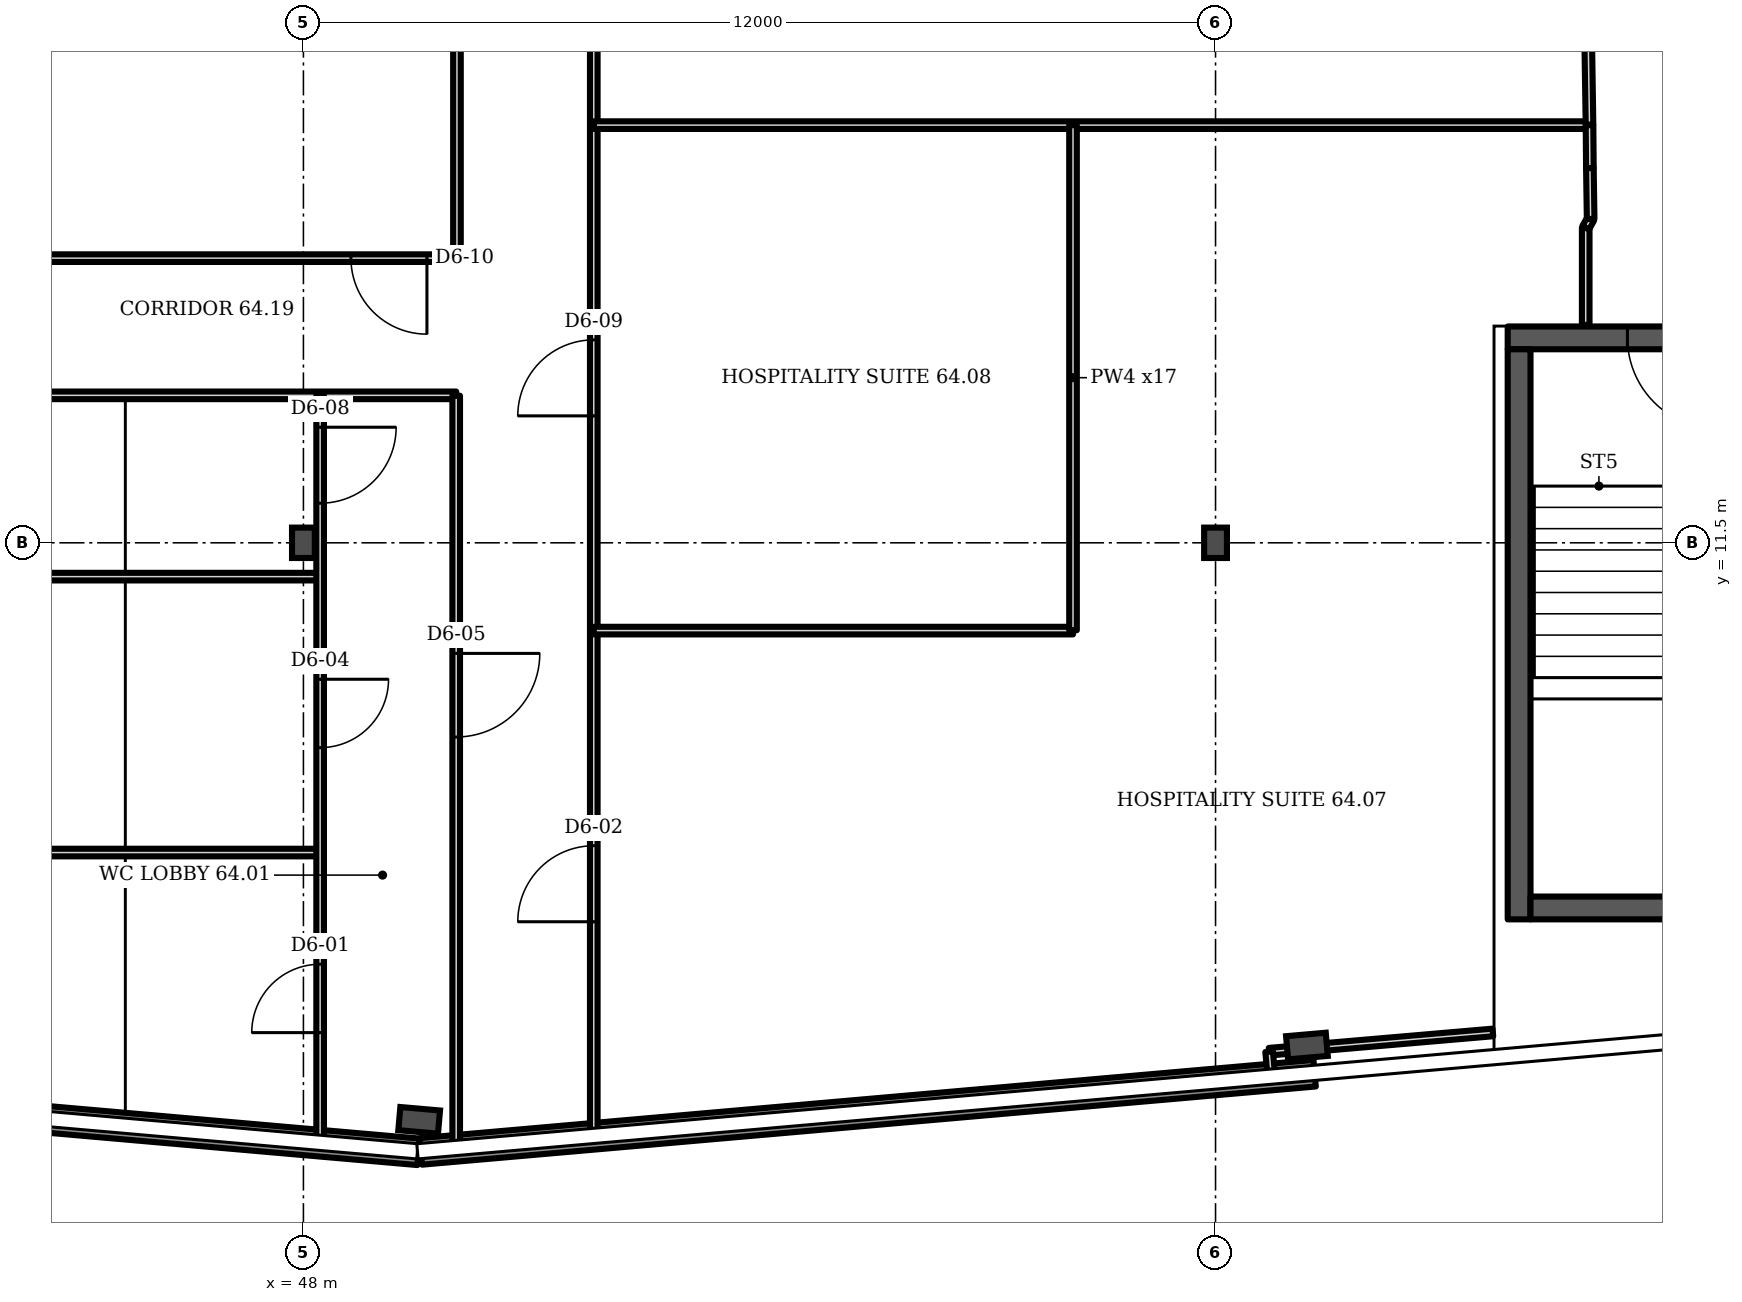
"""IFC4 building model, lengths in metres.
Left out: names, types, materials, properties, quantities, classifications, styles, units other than length and angle.
Written with IfcOpenShell. Run it as: python <this file> out.ifc"""

import sys

from ifc_helpers import new_model, si_unit, direction, frame, frame_2d, origin, origin_2d, place, context, subcontext, project, spatial, rectangle, i_section, extrude, element, fill, save


model = new_model("IFC4")
c1 = context("Model", 3, precision=1e-05, world=origin(), true_north=direction((0.0, 1.0)))
c2 = subcontext(c1, "Body", "Model", "MODEL_VIEW")
j1 = project(units=[si_unit("LENGTHUNIT", "METRE"), si_unit("PLANEANGLEUNIT", "RADIAN")], contexts=[c1])
p1 = place(None, origin())
s1 = spatial("IfcSite", under=j1, at=p1, CompositionType="ELEMENT")
p2 = place(p1, origin())
s2 = spatial("IfcBuilding", under=s1, at=p2, CompositionType="ELEMENT")
p3 = place(p2, frame((0.0, 0.0, 253.9)))
s3 = spatial("IfcBuildingStorey", under=s2, at=p3, CompositionType="ELEMENT", Elevation=253.9)
for number, where, z_axis, x_axis in (
    (1, (49.523, 3.902, 0.0), (0.0, 0.0, 1.0), (-0.087, -0.996, 0.0)),
    (2, (61.202, 4.879, 0.0), (0.0, 0.0, 1.0), (0.087, -0.996, 0.0)),
):
    element("IfcColumn", number, at=place(p3, frame(where, z_axis=z_axis, x_axis=x_axis)), inside=s3, PredefinedType="COLUMN", context=c2, shape_type="SweptSolid", body=[
        extrude(i_section(OverallWidth=0.306, OverallDepth=0.524, WebThickness=0.021, FlangeThickness=0.04, FilletRadius=0.027, at=origin_2d()), origin(), (0.0, 0.0, 1.0), 3.6),
    ])
for number, where, z_axis, x_axis in (
    (3, (48.0, 11.5, 0.0), (0.0, 0.0, 1.0), (1.0, 0.0, 0.0)),
    (4, (60.0, 11.5, 0.0), (0.0, 0.0, 1.0), (1.0, 0.0, 0.0)),
):
    element("IfcColumn", number, at=place(p3, frame(where, z_axis=z_axis, x_axis=x_axis)), inside=s3, PredefinedType="COLUMN", context=c2, shape_type="SweptSolid", body=[
        extrude(i_section(OverallWidth=0.3, OverallDepth=0.4, WebThickness=0.013, FlangeThickness=0.024, FilletRadius=0.027, at=origin_2d()), origin(), (0.0, 0.0, 1.0), 3.6),
    ])
p4 = place(p3, frame((37.729, 4.519, 0.0), z_axis=(0.0, 0.0, 1.0), x_axis=(0.99619, -0.087167, 0.0)))
e5 = element("IfcWall", 5, at=p4, inside=s3, PredefinedType="SOLIDWALL", context=c2, shape_type="SweptSolid", body=[
    extrude(rectangle(XDim=11.831, YDim=0.35, at=frame_2d((5.915, 0.0))), origin(), (0.0, 0.0, 1.0), 1.0),
])
p5 = place(p3, frame((49.545, 3.493, 0.0), z_axis=(0.0, 0.0, 1.0), x_axis=(0.996196, 0.087141, 0.0)))
e6 = element("IfcWall", 6, at=p5, inside=s3, PredefinedType="SOLIDWALL", context=c2, shape_type="SweptSolid", body=[
    extrude(rectangle(XDim=11.803, YDim=0.35, at=frame_2d((5.902, 0.0))), origin(), (0.0, 0.0, 1.0), 1.0),
])
p6 = place(p3, frame((63.844, 14.196, 0.0), z_axis=(0.0, 0.0, 1.0), x_axis=(1.0, 0.0, 0.0)))
e7 = element("IfcWall", 7, at=p6, inside=s3, PredefinedType="SHEAR", context=c2, shape_type="SweptSolid", body=[
    extrude(rectangle(XDim=4.35, YDim=0.3, at=frame_2d((2.175, 0.0))), origin(), (0.0, 0.0, 1.0), 3.2),
])
p7 = place(p6, frame((1.575, 0.0, 0.0)))
e8 = element("IfcOpeningElement", 8, at=p7, cuts=e7, PredefinedType="OPENING", context=c2, shape_type="SweptSolid", body=[
    extrude(rectangle(XDim=1.2, YDim=2.1, at=frame_2d((0.6, 1.05))), frame((0.0, 0.16, 0.0), z_axis=(0.0, -1.0, 0.0), x_axis=(1.0, 0.0, 0.0)), (0.0, 0.0, 1.0), 0.32),
])
p8 = place(p3, frame((40.5, 15.245, 0.0), z_axis=(0.0, 0.0, 1.0), x_axis=(1.0, 0.0, 0.0)))
e9 = element("IfcWall", 9, at=p8, inside=s3, PredefinedType="PARTITIONING", context=c2, shape_type="SweptSolid", body=[
    extrude(rectangle(XDim=9.52, YDim=0.1, at=frame_2d((4.76, 0.0))), origin(), (0.0, 0.0, 1.0), 3.2),
])
p9 = place(p8, frame((8.125, 0.0, 0.0)))
e10 = element("IfcOpeningElement", 10, at=p9, cuts=e9, PredefinedType="OPENING", context=c2, shape_type="SweptSolid", body=[
    extrude(rectangle(XDim=1.0, YDim=2.1, at=frame_2d((0.5, 1.05))), frame((0.0, 0.06, 0.0), z_axis=(0.0, -1.0, 0.0), x_axis=(1.0, 0.0, 0.0)), (0.0, 0.0, 1.0), 0.12),
])
for number, where, z_axis, x_axis in (
    (11, (44.327, 7.425, 0.0), (0.0, 0.0, 1.0), (1.0, 0.0, 0.0)),
    (12, (44.327, 11.055, 0.0), (0.0, 0.0, 1.0), (1.0, 0.0, 0.0)),
):
    element("IfcWall", number, at=place(p3, frame(where, z_axis=z_axis, x_axis=x_axis)), inside=s3, PredefinedType="PARTITIONING", context=c2, shape_type="SweptSolid", body=[
        extrude(rectangle(XDim=3.893, YDim=0.1, at=frame_2d((1.946, 0.0))), origin(), (0.0, 0.0, 1.0), 3.2),
    ])
p10 = place(p3, frame((44.327, 13.44, 0.0), z_axis=(0.0, 0.0, 1.0), x_axis=(1.0, 0.0, 0.0)))
e13 = element("IfcWall", 13, at=p10, inside=s3, PredefinedType="PARTITIONING", context=c2, shape_type="SweptSolid", body=[
    extrude(rectangle(XDim=5.683, YDim=0.1, at=frame_2d((2.841, 0.0))), origin(), (0.0, 0.0, 1.0), 3.2),
])
p11 = place(p3, frame((48.22, 3.626, 0.0), z_axis=(0.0, 0.0, 1.0), x_axis=(0.0, 1.0, 0.0)))
e14 = element("IfcWall", 14, at=p11, inside=s3, PredefinedType="PARTITIONING", context=c2, shape_type="SweptSolid", body=[
    extrude(rectangle(XDim=9.809, YDim=0.1, at=frame_2d((4.904, 0.0))), origin(), (0.0, 0.0, 1.0), 2.58),
])
p12 = place(p11, frame((1.43, 0.0, 0.0)))
e15 = element("IfcOpeningElement", 15, at=p12, cuts=e14, PredefinedType="OPENING", context=c2, shape_type="SweptSolid", body=[
    extrude(rectangle(XDim=0.9, YDim=2.1, at=frame_2d((0.45, 1.05))), frame((0.0, 0.06, 0.0), z_axis=(0.0, -1.0, 0.0), x_axis=(1.0, 0.0, 0.0)), (0.0, 0.0, 1.0), 0.12),
])
p13 = place(p11, frame((5.179, 0.0, 0.0)))
e16 = element("IfcOpeningElement", 16, at=p13, cuts=e14, PredefinedType="OPENING", context=c2, shape_type="SweptSolid", body=[
    extrude(rectangle(XDim=0.9, YDim=2.1, at=frame_2d((0.45, 1.05))), frame((0.0, 0.06, 0.0), z_axis=(0.0, -1.0, 0.0), x_axis=(1.0, 0.0, 0.0)), (0.0, 0.0, 1.0), 0.12),
])
p14 = place(p11, frame((8.395, 0.0, 0.0)))
e17 = element("IfcOpeningElement", 17, at=p14, cuts=e14, PredefinedType="OPENING", context=c2, shape_type="SweptSolid", body=[
    extrude(rectangle(XDim=1.0, YDim=2.1, at=frame_2d((0.5, 1.05))), frame((0.0, 0.06, 0.0), z_axis=(0.0, -1.0, 0.0), x_axis=(1.0, 0.0, 0.0)), (0.0, 0.0, 1.0), 0.12),
])
p15 = place(p3, frame((50.01, 3.559, 0.0), z_axis=(0.0, 0.0, 1.0), x_axis=(0.0, 1.0, 0.0)))
e18 = element("IfcWall", 18, at=p15, inside=s3, PredefinedType="PARTITIONING", context=c2, shape_type="SweptSolid", body=[
    extrude(rectangle(XDim=9.876, YDim=0.1, at=frame_2d((4.938, 0.0))), origin(), (0.0, 0.0, 1.0), 2.58),
])
p16 = place(p15, frame((5.386, 0.0, 0.0)))
e19 = element("IfcOpeningElement", 19, at=p16, cuts=e18, PredefinedType="OPENING", context=c2, shape_type="SweptSolid", body=[
    extrude(rectangle(XDim=1.1, YDim=2.1, at=frame_2d((0.55, 1.05))), frame((0.0, 0.06, 0.0), z_axis=(0.0, -1.0, 0.0), x_axis=(1.0, 0.0, 0.0)), (0.0, 0.0, 1.0), 0.12),
])
p17 = place(p3, frame((50.02, 15.245, 0.0), z_axis=(0.0, 0.0, 1.0), x_axis=(0.0, 1.0, 0.0)))
e20 = element("IfcWall", 20, at=p17, inside=s3, PredefinedType="PARTITIONING", context=c2, shape_type="SweptSolid", body=[
    extrude(rectangle(XDim=15.255, YDim=0.1, at=frame_2d((7.627, 0.0))), origin(), (0.0, 0.0, 1.0), 3.2),
])
p18 = place(p17, frame((13.955, 0.0, 0.0)))
e21 = element("IfcOpeningElement", 21, at=p18, cuts=e20, PredefinedType="OPENING", context=c2, shape_type="SweptSolid", body=[
    extrude(rectangle(XDim=1.0, YDim=2.1, at=frame_2d((0.5, 1.05))), frame((0.0, 0.06, 0.0), z_axis=(0.0, -1.0, 0.0), x_axis=(1.0, 0.0, 0.0)), (0.0, 0.0, 1.0), 0.12),
])
p19 = place(p3, frame((51.82, 3.717, 0.0), z_axis=(0.0, 0.0, 1.0), x_axis=(0.0, 1.0, 0.0)))
e22 = element("IfcWall", 22, at=p19, inside=s3, PredefinedType="PARTITIONING", context=c2, shape_type="SweptSolid", body=[
    extrude(rectangle(XDim=26.783, YDim=0.1, at=frame_2d((13.391, 0.0))), origin(), (0.0, 0.0, 1.0), 2.58),
])
p20 = place(p19, frame((2.798, 0.0, 0.0)))
e23 = element("IfcOpeningElement", 23, at=p20, cuts=e22, PredefinedType="OPENING", context=c2, shape_type="SweptSolid", body=[
    extrude(rectangle(XDim=1.0, YDim=2.1, at=frame_2d((0.5, 1.05))), frame((0.0, 0.06, 0.0), z_axis=(0.0, -1.0, 0.0), x_axis=(1.0, 0.0, 0.0)), (0.0, 0.0, 1.0), 0.12),
])
p21 = place(p19, frame((9.453, 0.0, 0.0)))
e24 = element("IfcOpeningElement", 24, at=p21, cuts=e22, PredefinedType="OPENING", context=c2, shape_type="SweptSolid", body=[
    extrude(rectangle(XDim=1.0, YDim=2.1, at=frame_2d((0.5, 1.05))), frame((0.0, 0.06, 0.0), z_axis=(0.0, -1.0, 0.0), x_axis=(1.0, 0.0, 0.0)), (0.0, 0.0, 1.0), 0.12),
])
p22 = place(p3, frame((51.82, 10.345, 0.0), z_axis=(0.0, 0.0, 1.0), x_axis=(1.0, 0.0, 0.0)))
e25 = element("IfcWall", 25, at=p22, inside=s3, PredefinedType="PARTITIONING", context=c2, shape_type="SweptSolid", body=[
    extrude(rectangle(XDim=6.305, YDim=0.1, at=frame_2d((3.152, 0.0))), origin(), (0.0, 0.0, 1.0), 3.2),
])
p23 = place(p3, frame((51.82, 16.995, 0.0), z_axis=(0.0, 0.0, 1.0), x_axis=(1.0, 0.0, 0.0)))
e26 = element("IfcWall", 26, at=p23, inside=s3, PredefinedType="PARTITIONING", context=c2, shape_type="SweptSolid", body=[
    extrude(rectangle(XDim=13.1, YDim=0.1, at=frame_2d((6.55, 0.0))), origin(), (0.0, 0.0, 1.0), 3.2),
])
p24 = place(p3, frame((58.125, 10.35, 0.0), z_axis=(0.0, 0.0, 1.0), x_axis=(0.0, 1.0, 0.0)))
e27 = element("IfcWall", 27, at=p24, inside=s3, PredefinedType="PARTITIONING", context=c2, shape_type="SweptSolid", body=[
    extrude(rectangle(XDim=6.645, YDim=0.1, at=frame_2d((3.323, 0.0))), origin(), (0.0, 0.0, 1.0), 3.2),
])
p25 = place(p3, frame((60.705, 4.805, 0.0), z_axis=(0.0, 0.0, 1.0), x_axis=(0.996324, 0.085692, 0.0)))
e28 = element("IfcWall", 28, at=p25, inside=s3, PredefinedType="PARTITIONING", context=c2, shape_type="SweptSolid", body=[
    extrude(rectangle(XDim=2.955, YDim=0.1, at=frame_2d((1.477, 0.0))), origin(), (0.0, 0.0, 1.0), 2.58),
])
p26 = place(p3, frame((60.733, 4.497, 0.0), z_axis=(0.0, 0.0, 1.0), x_axis=(-0.090037, 0.995936, 0.0)))
e29 = element("IfcWall", 29, at=p26, inside=s3, PredefinedType="PARTITIONING", context=c2, shape_type="SweptSolid", body=[
    extrude(rectangle(XDim=0.309, YDim=0.1, at=frame_2d((0.155, 0.0))), origin(), (0.0, 0.0, 1.0), 3.2),
])
p27 = place(p3, frame((64.87, 14.366, 0.0), z_axis=(0.0, 0.0, 1.0), x_axis=(0.0, 1.0, 0.0)))
e30 = element("IfcWall", 30, at=p27, inside=s3, PredefinedType="PARTITIONING", context=c2, shape_type="SweptSolid", body=[
    extrude(rectangle(XDim=1.279, YDim=0.1, at=frame_2d((0.639, 0.0))), origin(), (0.0, 0.0, 1.0), 3.2),
])
p28 = place(p3, frame((64.87, 15.645, 0.0), z_axis=(0.0, 0.0, 1.0), x_axis=(0.491751, 0.870732, 0.0)))
e31 = element("IfcWall", 31, at=p28, inside=s3, PredefinedType="PARTITIONING", context=c2, shape_type="SweptSolid", body=[
    extrude(rectangle(XDim=0.132, YDim=0.1, at=frame_2d((0.066, 0.0))), origin(), (0.0, 0.0, 1.0), 3.2),
])
p29 = place(p3, frame((64.92, 17.0, 0.0), z_axis=(0.0, 0.0, 1.0), x_axis=(-0.015303, 0.999879, 0.0)))
e32 = element("IfcWall", 32, at=p29, inside=s3, PredefinedType="PARTITIONING", context=c2, shape_type="SweptSolid", body=[
    extrude(rectangle(XDim=2.935, YDim=0.1, at=frame_2d((1.468, 0.0))), origin(), (0.0, 0.0, 1.0), 3.2),
])
p30 = place(p29, frame((1.564, 0.0, 0.0)))
e33 = element("IfcOpeningElement", 33, at=p30, cuts=e32, PredefinedType="OPENING", context=c2, shape_type="SweptSolid", body=[
    extrude(rectangle(XDim=1.0, YDim=2.1, at=frame_2d((0.5, 1.05))), frame((0.0, 0.06, 0.0), z_axis=(0.0, -1.0, 0.0), x_axis=(1.0, 0.0, 0.0)), (0.0, 0.0, 1.0), 0.12),
])
p31 = place(p3, frame((64.925, 16.43, 0.0), z_axis=(0.0, 0.0, 1.0), x_axis=(-0.009071, 0.999963, 0.0)))
e34 = element("IfcWall", 34, at=p31, inside=s3, PredefinedType="PARTITIONING", context=c2, shape_type="SweptSolid", body=[
    extrude(rectangle(XDim=0.565, YDim=0.1, at=frame_2d((0.283, 0.0))), origin(), (0.0, 0.0, 1.0), 3.2),
])
p32 = place(p3, frame((64.935, 15.76, 0.0), z_axis=(0.0, 0.0, 1.0), x_axis=(-0.01494, 0.999887, 0.0)))
e35 = element("IfcWall", 35, at=p32, inside=s3, PredefinedType="PARTITIONING", context=c2, shape_type="SweptSolid", body=[
    extrude(rectangle(XDim=0.67, YDim=0.1, at=frame_2d((0.335, 0.0))), origin(), (0.0, 0.0, 1.0), 3.2),
])
p33 = place(p3, frame((63.994, 6.546, 0.0), z_axis=(0.0, 0.0, 1.0), x_axis=(0.0, 1.0, 0.0)))
e36 = element("IfcWall", 36, at=p33, inside=s3, PredefinedType="SHEAR", context=c2, shape_type="SweptSolid", body=[
    extrude(rectangle(XDim=7.5, YDim=0.3, at=frame_2d((3.75, 0.0))), origin(), (0.0, 0.0, 1.0), 3.2),
])
p34 = place(p3, frame((64.144, 6.696, 0.0), z_axis=(0.0, 0.0, 1.0), x_axis=(1.0, 0.0, 0.0)))
e37 = element("IfcWall", 37, at=p34, inside=s3, PredefinedType="SHEAR", context=c2, shape_type="SweptSolid", body=[
    extrude(rectangle(XDim=3.75, YDim=0.3, at=frame_2d((1.875, 0.0))), origin(), (0.0, 0.0, 1.0), 3.2),
])
p35 = place(p7, origin())
e38 = element("IfcDoor", 38, at=p35, inside=s3, OperationType="SINGLE_SWING_RIGHT", PredefinedType="DOOR", context=c2, shape_type="SweptSolid", body=[
    extrude(rectangle(XDim=1.2, YDim=2.1, at=frame_2d((0.6, 1.05))), frame((0.0, 0.025, 0.0), z_axis=(0.0, -1.0, 0.0), x_axis=(1.0, 0.0, 0.0)), (0.0, 0.0, 1.0), 0.05),
])
fill(e8, e38)
p36 = place(p12, origin())
e39 = element("IfcDoor", 39, at=p36, inside=s3, OperationType="SINGLE_SWING_LEFT", PredefinedType="DOOR", context=c2, shape_type="SweptSolid", body=[
    extrude(rectangle(XDim=0.9, YDim=2.1, at=frame_2d((0.45, 1.05))), frame((0.0, 0.025, 0.0), z_axis=(0.0, -1.0, 0.0), x_axis=(1.0, 0.0, 0.0)), (0.0, 0.0, 1.0), 0.05),
])
fill(e15, e39)
p37 = place(p20, origin())
e40 = element("IfcDoor", 40, at=p37, inside=s3, OperationType="SINGLE_SWING_LEFT", PredefinedType="DOOR", context=c2, shape_type="SweptSolid", body=[
    extrude(rectangle(XDim=1.0, YDim=2.1, at=frame_2d((0.5, 1.05))), frame((0.0, 0.025, 0.0), z_axis=(0.0, -1.0, 0.0), x_axis=(1.0, 0.0, 0.0)), (0.0, 0.0, 1.0), 0.05),
])
fill(e23, e40)
p38 = place(p13, origin())
e41 = element("IfcDoor", 41, at=p38, inside=s3, OperationType="SINGLE_SWING_RIGHT", PredefinedType="DOOR", context=c2, shape_type="SweptSolid", body=[
    extrude(rectangle(XDim=0.9, YDim=2.1, at=frame_2d((0.45, 1.05))), frame((0.0, 0.025, 0.0), z_axis=(0.0, -1.0, 0.0), x_axis=(1.0, 0.0, 0.0)), (0.0, 0.0, 1.0), 0.05),
])
fill(e16, e41)
p39 = place(p16, origin())
e42 = element("IfcDoor", 42, at=p39, inside=s3, OperationType="SINGLE_SWING_RIGHT", PredefinedType="DOOR", context=c2, shape_type="SweptSolid", body=[
    extrude(rectangle(XDim=1.1, YDim=2.1, at=frame_2d((0.55, 1.05))), frame((0.0, 0.025, 0.0), z_axis=(0.0, -1.0, 0.0), x_axis=(1.0, 0.0, 0.0)), (0.0, 0.0, 1.0), 0.05),
])
fill(e19, e42)
p40 = place(p14, origin())
e43 = element("IfcDoor", 43, at=p40, inside=s3, OperationType="SINGLE_SWING_RIGHT", PredefinedType="DOOR", context=c2, shape_type="SweptSolid", body=[
    extrude(rectangle(XDim=1.0, YDim=2.1, at=frame_2d((0.5, 1.05))), frame((0.0, 0.025, 0.0), z_axis=(0.0, -1.0, 0.0), x_axis=(1.0, 0.0, 0.0)), (0.0, 0.0, 1.0), 0.05),
])
fill(e17, e43)
p41 = place(p21, origin())
e44 = element("IfcDoor", 44, at=p41, inside=s3, OperationType="SINGLE_SWING_LEFT", PredefinedType="DOOR", context=c2, shape_type="SweptSolid", body=[
    extrude(rectangle(XDim=1.0, YDim=2.1, at=frame_2d((0.5, 1.05))), frame((0.0, 0.025, 0.0), z_axis=(0.0, -1.0, 0.0), x_axis=(1.0, 0.0, 0.0)), (0.0, 0.0, 1.0), 0.05),
])
fill(e24, e44)
p42 = place(p9, origin())
e45 = element("IfcDoor", 45, at=p42, inside=s3, OperationType="SINGLE_SWING_RIGHT", PredefinedType="DOOR", context=c2, shape_type="SweptSolid", body=[
    extrude(rectangle(XDim=1.0, YDim=2.1, at=frame_2d((0.5, 1.05))), frame((0.0, 0.025, 0.0), z_axis=(0.0, -1.0, 0.0), x_axis=(1.0, 0.0, 0.0)), (0.0, 0.0, 1.0), 0.05),
])
fill(e10, e45)
save(model, sys.argv[1])
